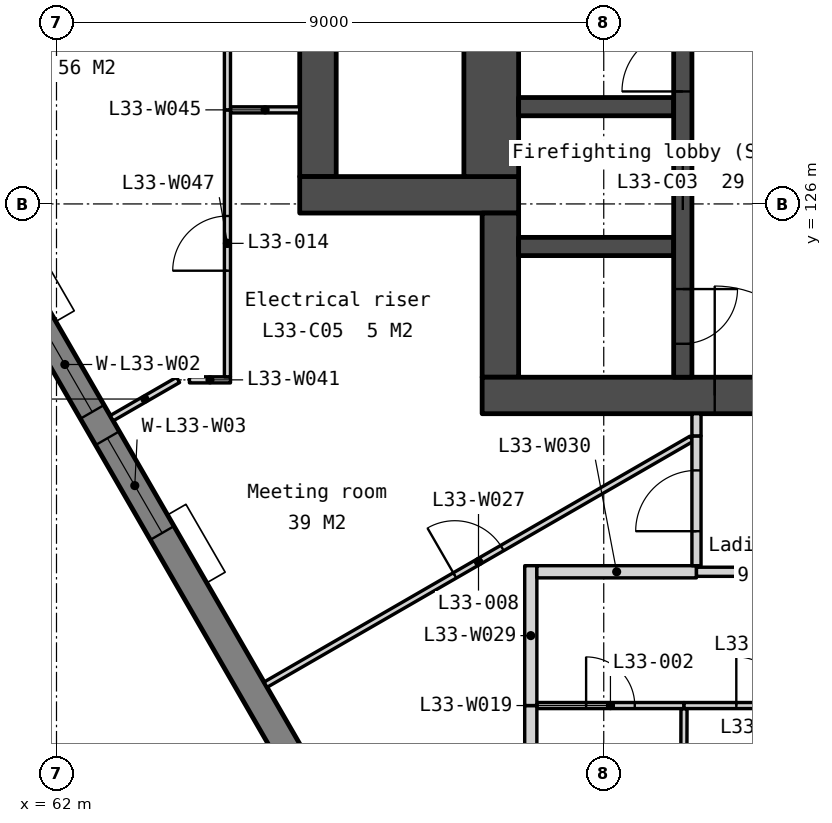
"""IFC4 building model, lengths in metres.
Left out: names, types, materials, properties, quantities, classifications, styles, units other than length and angle.
Written with IfcOpenShell. Run it as: python <this file> out.ifc"""

import sys

from ifc_helpers import new_model, si_unit, direction, frame, frame_2d, origin, place, context, subcontext, project, spatial, polyline, rectangle, outline, extrude, element, fill, save


model = new_model("IFC4")
c1 = context("Model", 3, precision=1e-05, world=origin(), true_north=direction((0.0, 1.0)))
c2 = subcontext(c1, "Body", "Model", "MODEL_VIEW")
j1 = project(units=[si_unit("LENGTHUNIT", "METRE"), si_unit("PLANEANGLEUNIT", "RADIAN")], contexts=[c1])
p1 = place(None, origin())
s1 = spatial("IfcSite", under=j1, at=p1, CompositionType="ELEMENT")
p2 = place(p1, origin())
s2 = spatial("IfcBuilding", under=s1, at=p2, CompositionType="ELEMENT")
p3 = place(p2, frame((0.0, 0.0, 132.5)))
s3 = spatial("IfcBuildingStorey", under=s2, at=p3, CompositionType="ELEMENT", Elevation=132.5)
p4 = place(p3, frame((66.3, 131.35, 0.0), z_axis=(0.0, 0.0, 1.0), x_axis=(0.0, -1.0, 0.0)))
e1 = element("IfcWall", 1, at=p4, inside=s3, PredefinedType="SOLIDWALL", context=c2, shape_type="SweptSolid", body=[
    extrude(rectangle(XDim=4.9, YDim=0.6, at=frame_2d((2.45, 0.0))), origin(), (0.0, 0.0, 1.0), 3.75),
])
p5 = place(p3, frame((66.0, 126.15, 0.0), z_axis=(0.0, 0.0, 1.0), x_axis=(1.0, 0.0, 0.0)))
e2 = element("IfcWall", 2, at=p5, inside=s3, PredefinedType="SOLIDWALL", context=c2, shape_type="SweptSolid", body=[
    extrude(rectangle(XDim=3.6, YDim=0.6, at=frame_2d((1.8, 0.0))), origin(), (0.0, 0.0, 1.0), 3.75),
])
p6 = place(p3, frame((69.15, 131.35, 0.0), z_axis=(0.0, 0.0, 1.0), x_axis=(0.0, -1.0, 0.0)))
e3 = element("IfcWall", 3, at=p6, inside=s3, PredefinedType="SOLIDWALL", context=c2, shape_type="SweptSolid", body=[
    extrude(rectangle(XDim=4.9, YDim=0.9, at=frame_2d((2.45, 0.0))), origin(), (0.0, 0.0, 1.0), 3.75),
])
p7 = place(p3, frame((69.3, 125.85, 0.0), z_axis=(0.0, 0.0, 1.0), x_axis=(0.0, -1.0, 0.0)))
e4 = element("IfcWall", 4, at=p7, inside=s3, PredefinedType="SOLIDWALL", context=c2, shape_type="SweptSolid", body=[
    extrude(rectangle(XDim=2.7, YDim=0.6, at=frame_2d((1.35, 0.0))), origin(), (0.0, 0.0, 1.0), 3.75),
])
p8 = place(p3, frame((69.0, 122.85, 0.0), z_axis=(0.0, 0.0, 1.0), x_axis=(1.0, 0.0, 0.0)))
e5 = element("IfcWall", 5, at=p8, inside=s3, PredefinedType="SOLIDWALL", context=c2, shape_type="SweptSolid", body=[
    extrude(rectangle(XDim=22.0, YDim=0.6, at=frame_2d((11.0, 0.0))), origin(), (0.0, 0.0, 1.0), 3.75),
])
p9 = place(p8, frame((16.375, 0.0, 0.0)))
e6 = element("IfcOpeningElement", 6, at=p9, cuts=e5, PredefinedType="OPENING", context=c2, shape_type="SweptSolid", body=[
    extrude(rectangle(XDim=1.8, YDim=2.1, at=frame_2d((0.9, 1.05))), frame((0.0, 0.31, 0.0), z_axis=(0.0, -1.0, 0.0), x_axis=(1.0, 0.0, 0.0)), (0.0, 0.0, 1.0), 0.62),
])
p10 = place(p8, frame((3.825, 0.0, 0.0)))
e7 = element("IfcOpeningElement", 7, at=p10, cuts=e5, PredefinedType="OPENING", context=c2, shape_type="SweptSolid", body=[
    extrude(rectangle(XDim=1.8, YDim=2.1, at=frame_2d((0.9, 1.05))), frame((0.0, 0.31, 0.0), z_axis=(0.0, -1.0, 0.0), x_axis=(1.0, 0.0, 0.0)), (0.0, 0.0, 1.0), 0.62),
])
p11 = place(p8, frame((12.85, 0.0, 0.0)))
e8 = element("IfcOpeningElement", 8, at=p11, cuts=e5, PredefinedType="OPENING", context=c2, shape_type="SweptSolid", body=[
    extrude(rectangle(XDim=1.5, YDim=2.1, at=frame_2d((0.75, 1.05))), frame((0.0, 0.31, 0.0), z_axis=(0.0, -1.0, 0.0), x_axis=(1.0, 0.0, 0.0)), (0.0, 0.0, 1.0), 0.62),
])
for number, where, z_axis, x_axis in (
    (9, (69.6, 127.6, 0.0), (0.0, 0.0, 1.0), (1.0, 0.0, 0.0)),
    (10, (69.6, 125.3, 0.0), (0.0, 0.0, 1.0), (1.0, 0.0, 0.0)),
):
    element("IfcWall", number, at=place(p3, frame(where, z_axis=z_axis, x_axis=x_axis)), inside=s3, PredefinedType="SOLIDWALL", context=c2, shape_type="SweptSolid", body=[
        extrude(rectangle(XDim=2.55, YDim=0.3, at=frame_2d((1.275, 0.0))), origin(), (0.0, 0.0, 1.0), 3.75),
    ])
p12 = place(p3, frame((72.3, 133.95, 0.0), z_axis=(0.0, 0.0, 1.0), x_axis=(0.0, -1.0, 0.0)))
e11 = element("IfcWall", 11, at=p12, inside=s3, PredefinedType="SOLIDWALL", context=c2, shape_type="SweptSolid", body=[
    extrude(rectangle(XDim=10.8, YDim=0.3, at=frame_2d((5.4, 0.0))), origin(), (0.0, 0.0, 1.0), 3.75),
])
p13 = place(p12, frame((6.95, 0.0, 0.0)))
e12 = element("IfcOpeningElement", 12, at=p13, cuts=e11, PredefinedType="OPENING", context=c2, shape_type="SweptSolid", body=[
    extrude(rectangle(XDim=1.1, YDim=2.1, at=frame_2d((0.55, 1.05))), frame((0.0, 0.16, 0.0), z_axis=(0.0, -1.0, 0.0), x_axis=(1.0, 0.0, 0.0)), (0.0, 0.0, 1.0), 0.32),
])
p14 = place(p12, frame((9.35, 0.0, 0.0)))
e13 = element("IfcOpeningElement", 13, at=p14, cuts=e11, PredefinedType="OPENING", context=c2, shape_type="SweptSolid", body=[
    extrude(rectangle(XDim=0.9, YDim=2.1, at=frame_2d((0.45, 1.05))), frame((0.0, 0.16, 0.0), z_axis=(0.0, -1.0, 0.0), x_axis=(1.0, 0.0, 0.0)), (0.0, 0.0, 1.0), 0.32),
])
p15 = place(p12, frame((5.1, 0.0, 0.0)))
e14 = element("IfcOpeningElement", 14, at=p15, cuts=e11, PredefinedType="OPENING", context=c2, shape_type="SweptSolid", body=[
    extrude(rectangle(XDim=1.0, YDim=2.1, at=frame_2d((0.5, 1.05))), frame((0.0, 0.16, 0.0), z_axis=(0.0, -1.0, 0.0), x_axis=(1.0, 0.0, 0.0)), (0.0, 0.0, 1.0), 0.32),
])
p16 = place(p3, frame((57.652, 131.129, -0.15), z_axis=(0.0, 0.0, 1.0), x_axis=(0.499997369791, -0.866026922331, 0.0)))
e15 = element("IfcWall", 15, at=p16, inside=s3, PredefinedType="SOLIDWALL", context=c2, shape_type="SweptSolid", body=[
    extrude(outline(polyline([(40.486, 0.0), (40.486, 3.9), (0.0, 3.9), (0.0, 0.0), (40.486, 0.0)])), frame((0.0, 0.225, 0.0), z_axis=(0.0, -1.0, 0.0), x_axis=(1.0, 0.0, 0.0)), (0.0, 0.0, 1.0), 0.45),
])
p17 = place(p16, frame((0.837, 0.0, 0.95)))
e16 = element("IfcOpeningElement", 16, at=p17, cuts=e15, PredefinedType="OPENING", context=c2, shape_type="SweptSolid", body=[
    extrude(rectangle(XDim=1.2, YDim=2.2, at=frame_2d((0.6, 1.1))), frame((0.0, 0.235, 0.0), z_axis=(0.0, -1.0, 0.0), x_axis=(1.0, 0.0, 0.0)), (0.0, 0.0, 1.0), 0.47),
])
p18 = place(p16, frame((8.072, 0.0, 0.95)))
e17 = element("IfcOpeningElement", 17, at=p18, cuts=e15, PredefinedType="OPENING", context=c2, shape_type="SweptSolid", body=[
    extrude(rectangle(XDim=1.8, YDim=2.2, at=frame_2d((0.9, 1.1))), frame((0.0, 0.235, 0.0), z_axis=(0.0, -1.0, 0.0), x_axis=(1.0, 0.0, 0.0)), (0.0, 0.0, 1.0), 0.47),
])
p19 = place(p16, frame((10.372, 0.0, 0.95)))
e18 = element("IfcOpeningElement", 18, at=p19, cuts=e15, PredefinedType="OPENING", context=c2, shape_type="SweptSolid", body=[
    extrude(rectangle(XDim=1.8, YDim=2.2, at=frame_2d((0.9, 1.1))), frame((0.0, 0.235, 0.0), z_axis=(0.0, -1.0, 0.0), x_axis=(1.0, 0.0, 0.0)), (0.0, 0.0, 1.0), 0.47),
])
p20 = place(p16, frame((18.193, 0.0, 0.95)))
e19 = element("IfcOpeningElement", 19, at=p20, cuts=e15, PredefinedType="OPENING", context=c2, shape_type="SweptSolid", body=[
    extrude(rectangle(XDim=1.8, YDim=2.2, at=frame_2d((0.9, 1.1))), frame((0.0, 0.235, 0.0), z_axis=(0.0, -1.0, 0.0), x_axis=(1.0, 0.0, 0.0)), (0.0, 0.0, 1.0), 0.47),
])
p21 = place(p16, frame((20.493, 0.0, 0.95)))
e20 = element("IfcOpeningElement", 20, at=p21, cuts=e15, PredefinedType="OPENING", context=c2, shape_type="SweptSolid", body=[
    extrude(rectangle(XDim=1.8, YDim=2.2, at=frame_2d((0.9, 1.1))), frame((0.0, 0.235, 0.0), z_axis=(0.0, -1.0, 0.0), x_axis=(1.0, 0.0, 0.0)), (0.0, 0.0, 1.0), 0.47),
])
p22 = place(p16, frame((28.315, 0.0, 0.95)))
e21 = element("IfcOpeningElement", 21, at=p22, cuts=e15, PredefinedType="OPENING", context=c2, shape_type="SweptSolid", body=[
    extrude(rectangle(XDim=1.8, YDim=2.2, at=frame_2d((0.9, 1.1))), frame((0.0, 0.235, 0.0), z_axis=(0.0, -1.0, 0.0), x_axis=(1.0, 0.0, 0.0)), (0.0, 0.0, 1.0), 0.47),
])
p23 = place(p16, frame((30.615, 0.0, 0.95)))
e22 = element("IfcOpeningElement", 22, at=p23, cuts=e15, PredefinedType="OPENING", context=c2, shape_type="SweptSolid", body=[
    extrude(rectangle(XDim=1.8, YDim=2.2, at=frame_2d((0.9, 1.1))), frame((0.0, 0.235, 0.0), z_axis=(0.0, -1.0, 0.0), x_axis=(1.0, 0.0, 0.0)), (0.0, 0.0, 1.0), 0.47),
])
p24 = place(p16, frame((38.449, 0.0, 0.95)))
e23 = element("IfcOpeningElement", 23, at=p24, cuts=e15, PredefinedType="OPENING", context=c2, shape_type="SweptSolid", body=[
    extrude(rectangle(XDim=1.2, YDim=2.2, at=frame_2d((0.6, 1.1))), frame((0.0, 0.235, 0.0), z_axis=(0.0, -1.0, 0.0), x_axis=(1.0, 0.0, 0.0)), (0.0, 0.0, 1.0), 0.47),
])
p25 = place(p3, frame((72.31, 114.05, 0.0), z_axis=(0.0, 0.0, 1.0), x_axis=(0.002608686776, 0.999996597371, 0.0)))
e24 = element("IfcWall", 24, at=p25, inside=s3, PredefinedType="PARTITIONING", context=c2, shape_type="SweptSolid", body=[
    extrude(rectangle(XDim=3.65, YDim=0.1, at=frame_2d((1.825, 0.0))), origin(), (0.0, 0.0, 1.0), 3.75),
])
p26 = place(p3, frame((69.9, 117.75, 0.0), z_axis=(0.0, 0.0, 1.0), x_axis=(1.0, 0.0, 0.0)))
e25 = element("IfcWall", 25, at=p26, inside=s3, PredefinedType="PARTITIONING", context=c2, shape_type="SweptSolid", body=[
    extrude(rectangle(XDim=2.42, YDim=0.1, at=frame_2d((1.21, 0.0))), origin(), (0.0, 0.0, 1.0), 3.75),
])
p27 = place(p26, frame((0.81, 0.0, 0.0)))
e26 = element("IfcOpeningElement", 26, at=p27, cuts=e25, PredefinedType="OPENING", context=c2, shape_type="SweptSolid", body=[
    extrude(rectangle(XDim=0.8, YDim=2.1, at=frame_2d((0.4, 1.05))), frame((0.0, 0.06, 0.0), z_axis=(0.0, -1.0, 0.0), x_axis=(1.0, 0.0, 0.0)), (0.0, 0.0, 1.0), 0.12),
])
p28 = place(p3, frame((72.32, 117.75, 0.0), z_axis=(0.0, 0.0, 1.0), x_axis=(1.0, 0.0, 0.0)))
e27 = element("IfcWall", 27, at=p28, inside=s3, PredefinedType="PARTITIONING", context=c2, shape_type="SweptSolid", body=[
    extrude(rectangle(XDim=2.52, YDim=0.1, at=frame_2d((1.26, 0.0))), origin(), (0.0, 0.0, 1.0), 3.75),
])
p29 = place(p28, frame((0.86, 0.0, 0.0)))
e28 = element("IfcOpeningElement", 28, at=p29, cuts=e27, PredefinedType="OPENING", context=c2, shape_type="SweptSolid", body=[
    extrude(rectangle(XDim=0.8, YDim=2.1, at=frame_2d((0.4, 1.05))), frame((0.0, 0.06, 0.0), z_axis=(0.0, -1.0, 0.0), x_axis=(1.0, 0.0, 0.0)), (0.0, 0.0, 1.0), 0.12),
])
p30 = place(p3, frame((69.8, 114.768, 0.0), z_axis=(0.0, 0.0, 1.0), x_axis=(0.0, 1.0, 0.0)))
e29 = element("IfcWall", 29, at=p30, inside=s3, PredefinedType="PARTITIONING", context=c2, shape_type="SweptSolid", body=[
    extrude(rectangle(XDim=2.982, YDim=0.2, at=frame_2d((1.491, 0.0))), origin(), (0.0, 0.0, 1.0), 3.75),
])
p31 = place(p3, frame((65.438, 118.093, 0.0), z_axis=(0.0, 0.0, 1.0), x_axis=(0.866029768103, 0.499992440702, 0.0)))
e30 = element("IfcWall", 30, at=p31, inside=s3, PredefinedType="PARTITIONING", context=c2, shape_type="SweptSolid", body=[
    extrude(rectangle(XDim=8.089, YDim=0.1, at=frame_2d((4.044, 0.0))), origin(), (0.0, 0.0, 1.0), 3.75),
])
p32 = place(p31, frame((3.594, 0.0, 0.0)))
e31 = element("IfcOpeningElement", 31, at=p32, cuts=e30, PredefinedType="OPENING", context=c2, shape_type="SweptSolid", body=[
    extrude(rectangle(XDim=0.9, YDim=2.1, at=frame_2d((0.45, 1.05))), frame((0.0, 0.06, 0.0), z_axis=(0.0, -1.0, 0.0), x_axis=(1.0, 0.0, 0.0)), (0.0, 0.0, 1.0), 0.12),
])
p33 = place(p3, frame((69.8, 117.75, 0.0), z_axis=(0.0, 0.0, 1.0), x_axis=(0.0, 1.0, 0.0)))
e32 = element("IfcWall", 32, at=p33, inside=s3, PredefinedType="PARTITIONING", context=c2, shape_type="SweptSolid", body=[
    extrude(rectangle(XDim=2.3, YDim=0.2, at=frame_2d((1.15, 0.0))), origin(), (0.0, 0.0, 1.0), 3.75),
])
p34 = place(p3, frame((69.9, 119.95, 0.0), z_axis=(0.0, 0.0, 1.0), x_axis=(1.0, 0.0, 0.0)))
e33 = element("IfcWall", 33, at=p34, inside=s3, PredefinedType="PARTITIONING", context=c2, shape_type="SweptSolid", body=[
    extrude(rectangle(XDim=2.625, YDim=0.2, at=frame_2d((1.312, 0.0))), origin(), (0.0, 0.0, 1.0), 3.75),
])
p35 = place(p3, frame((72.525, 120.05, 0.0), z_axis=(0.0, 0.0, 1.0), x_axis=(0.0, 1.0, 0.0)))
e34 = element("IfcWall", 34, at=p35, inside=s3, PredefinedType="PARTITIONING", context=c2, shape_type="SweptSolid", body=[
    extrude(rectangle(XDim=2.135, YDim=0.15, at=frame_2d((1.067, 0.0))), origin(), (0.0, 0.0, 1.0), 3.75),
])
p36 = place(p35, frame((0.567, 0.0, 0.0)))
e35 = element("IfcOpeningElement", 35, at=p36, cuts=e34, PredefinedType="OPENING", context=c2, shape_type="SweptSolid", body=[
    extrude(rectangle(XDim=1.0, YDim=2.1, at=frame_2d((0.5, 1.05))), frame((0.0, 0.085, 0.0), z_axis=(0.0, -1.0, 0.0), x_axis=(1.0, 0.0, 0.0)), (0.0, 0.0, 1.0), 0.17),
])
p37 = place(p3, frame((72.525, 119.95, 0.0), z_axis=(0.0, 0.0, 1.0), x_axis=(1.0, 0.0, 0.0)))
e36 = element("IfcWall", 36, at=p37, inside=s3, PredefinedType="PARTITIONING", context=c2, shape_type="SweptSolid", body=[
    extrude(rectangle(XDim=6.2, YDim=0.15, at=frame_2d((3.1, 0.0))), origin(), (0.0, 0.0, 1.0), 3.75),
])
p38 = place(p37, frame((2.6, 0.0, 0.0)))
e37 = element("IfcOpeningElement", 37, at=p38, cuts=e36, PredefinedType="OPENING", context=c2, shape_type="SweptSolid", body=[
    extrude(rectangle(XDim=1.0, YDim=2.1, at=frame_2d((0.5, 1.05))), frame((0.0, 0.085, 0.0), z_axis=(0.0, -1.0, 0.0), x_axis=(1.0, 0.0, 0.0)), (0.0, 0.0, 1.0), 0.17),
])
p39 = place(p3, frame((72.525, 122.185, 0.0), z_axis=(0.0, 0.0, 1.0), x_axis=(0.0, 1.0, 0.0)))
e38 = element("IfcWall", 38, at=p39, inside=s3, PredefinedType="PARTITIONING", context=c2, shape_type="SweptSolid", body=[
    extrude(rectangle(XDim=0.365, YDim=0.15, at=frame_2d((0.183, 0.0))), origin(), (0.0, 0.0, 1.0), 3.75),
])
p40 = place(p3, frame((62.907, 122.476, 0.0), z_axis=(0.0, 0.0, 1.0), x_axis=(0.86607923909, 0.499906742921, 0.0)))
e39 = element("IfcWall", 39, at=p40, inside=s3, PredefinedType="PARTITIONING", context=c2, shape_type="SweptSolid", body=[
    extrude(rectangle(XDim=1.261, YDim=0.1, at=frame_2d((0.631, 0.0))), origin(), (0.0, 0.0, 1.0), 3.75),
])
p41 = place(p3, frame((64.187, 123.106, 0.0), z_axis=(0.0, 0.0, 1.0), x_axis=(0.999999934552, 0.000361794477, 0.0)))
e40 = element("IfcWall", 40, at=p41, inside=s3, PredefinedType="PARTITIONING", context=c2, shape_type="SweptSolid", body=[
    extrude(rectangle(XDim=0.675, YDim=0.1, at=frame_2d((0.337, 0.0))), origin(), (0.0, 0.0, 1.0), 3.75),
])
p42 = place(p3, frame((64.861, 127.547, 0.0), z_axis=(0.0, 0.0, 1.0), x_axis=(1.0, 0.0, 0.0)))
e41 = element("IfcWall", 41, at=p42, inside=s3, PredefinedType="PARTITIONING", context=c2, shape_type="SweptSolid", body=[
    extrude(rectangle(XDim=1.139, YDim=0.1, at=frame_2d((0.569, 0.0))), origin(), (0.0, 0.0, 1.0), 3.75),
])
p43 = place(p3, frame((64.811, 123.156, 0.0), z_axis=(0.0, 0.0, 1.0), x_axis=(0.0, 1.0, 0.0)))
e42 = element("IfcWall", 42, at=p43, inside=s3, PredefinedType="PARTITIONING", context=c2, shape_type="SweptSolid", body=[
    extrude(rectangle(XDim=4.391, YDim=0.1, at=frame_2d((2.195, 0.0))), origin(), (0.0, 0.0, 1.0), 3.75),
])
p44 = place(p43, frame((1.745, 0.0, 0.0)))
e43 = element("IfcOpeningElement", 43, at=p44, cuts=e42, PredefinedType="OPENING", context=c2, shape_type="SweptSolid", body=[
    extrude(rectangle(XDim=0.9, YDim=2.1, at=frame_2d((0.45, 1.05))), frame((0.0, 0.06, 0.0), z_axis=(0.0, -1.0, 0.0), x_axis=(1.0, 0.0, 0.0)), (0.0, 0.0, 1.0), 0.12),
])
p45 = place(p3, frame((64.811, 127.547, 0.0), z_axis=(0.0, 0.0, 1.0), x_axis=(0.0, 1.0, 0.0)))
e44 = element("IfcWall", 44, at=p45, inside=s3, PredefinedType="PARTITIONING", context=c2, shape_type="SweptSolid", body=[
    extrude(rectangle(XDim=7.003, YDim=0.1, at=frame_2d((3.501, 0.0))), origin(), (0.0, 0.0, 1.0), 3.75),
])
p46 = place(p45, frame((3.052, 0.0, 0.0)))
e45 = element("IfcOpeningElement", 45, at=p46, cuts=e44, PredefinedType="OPENING", context=c2, shape_type="SweptSolid", body=[
    extrude(rectangle(XDim=0.9, YDim=2.1, at=frame_2d((0.45, 1.05))), frame((0.0, 0.06, 0.0), z_axis=(0.0, -1.0, 0.0), x_axis=(1.0, 0.0, 0.0)), (0.0, 0.0, 1.0), 0.12),
])
p47 = place(p13, origin())
e46 = element("IfcDoor", 46, at=p47, inside=s3, OperationType="SLIDING_TO_LEFT", PredefinedType="DOOR", context=c2, shape_type="SweptSolid", body=[
    extrude(rectangle(XDim=1.1, YDim=2.1, at=frame_2d((0.55, 1.05))), frame((0.0, 0.025, 0.0), z_axis=(0.0, -1.0, 0.0), x_axis=(1.0, 0.0, 0.0)), (0.0, 0.0, 1.0), 0.05),
])
fill(e12, e46)
p48 = place(p10, origin())
e47 = element("IfcDoor", 47, at=p48, inside=s3, OperationType="DOUBLE_DOOR_DOUBLE_SWING", PredefinedType="DOOR", context=c2, shape_type="SweptSolid", body=[
    extrude(rectangle(XDim=1.8, YDim=2.1, at=frame_2d((0.9, 1.05))), frame((0.0, 0.025, 0.0), z_axis=(0.0, -1.0, 0.0), x_axis=(1.0, 0.0, 0.0)), (0.0, 0.0, 1.0), 0.05),
])
fill(e7, e47)
p49 = place(p14, origin())
e48 = element("IfcDoor", 48, at=p49, inside=s3, OperationType="SINGLE_SWING_LEFT", PredefinedType="DOOR", context=c2, shape_type="SweptSolid", body=[
    extrude(rectangle(XDim=0.9, YDim=2.1, at=frame_2d((0.45, 1.05))), frame((0.0, 0.025, 0.0), z_axis=(0.0, -1.0, 0.0), x_axis=(1.0, 0.0, 0.0)), (0.0, 0.0, 1.0), 0.05),
])
fill(e13, e48)
p50 = place(p15, origin())
e49 = element("IfcDoor", 49, at=p50, inside=s3, OperationType="SINGLE_SWING_RIGHT", PredefinedType="DOOR", context=c2, shape_type="SweptSolid", body=[
    extrude(rectangle(XDim=1.0, YDim=2.1, at=frame_2d((0.5, 1.05))), frame((0.0, 0.025, 0.0), z_axis=(0.0, -1.0, 0.0), x_axis=(1.0, 0.0, 0.0)), (0.0, 0.0, 1.0), 0.05),
])
fill(e14, e49)
p51 = place(p18, origin())
e50 = element("IfcWindow", 50, at=p51, inside=s3, PartitioningType="SINGLE_PANEL", PredefinedType="WINDOW", context=c2, shape_type="SweptSolid", body=[
    extrude(rectangle(XDim=1.8, YDim=2.2, at=frame_2d((0.9, 1.1))), frame((0.0, 0.03, 0.0), z_axis=(0.0, -1.0, 0.0), x_axis=(1.0, 0.0, 0.0)), (0.0, 0.0, 1.0), 0.06),
])
fill(e17, e50)
p52 = place(p19, origin())
e51 = element("IfcWindow", 51, at=p52, inside=s3, PartitioningType="SINGLE_PANEL", PredefinedType="WINDOW", context=c2, shape_type="SweptSolid", body=[
    extrude(rectangle(XDim=1.8, YDim=2.2, at=frame_2d((0.9, 1.1))), frame((0.0, 0.03, 0.0), z_axis=(0.0, -1.0, 0.0), x_axis=(1.0, 0.0, 0.0)), (0.0, 0.0, 1.0), 0.06),
])
fill(e18, e51)
p53 = place(p27, origin())
e52 = element("IfcDoor", 52, at=p53, inside=s3, OperationType="SINGLE_SWING_LEFT", PredefinedType="DOOR", context=c2, shape_type="SweptSolid", body=[
    extrude(rectangle(XDim=0.8, YDim=2.1, at=frame_2d((0.4, 1.05))), frame((0.0, 0.025, 0.0), z_axis=(0.0, -1.0, 0.0), x_axis=(1.0, 0.0, 0.0)), (0.0, 0.0, 1.0), 0.05),
])
fill(e26, e52)
p54 = place(p29, origin())
e53 = element("IfcDoor", 53, at=p54, inside=s3, OperationType="SINGLE_SWING_LEFT", PredefinedType="DOOR", context=c2, shape_type="SweptSolid", body=[
    extrude(rectangle(XDim=0.8, YDim=2.1, at=frame_2d((0.4, 1.05))), frame((0.0, 0.025, 0.0), z_axis=(0.0, -1.0, 0.0), x_axis=(1.0, 0.0, 0.0)), (0.0, 0.0, 1.0), 0.05),
])
fill(e28, e53)
p55 = place(p32, origin())
e54 = element("IfcDoor", 54, at=p55, inside=s3, OperationType="SINGLE_SWING_LEFT", PredefinedType="DOOR", context=c2, shape_type="SweptSolid", body=[
    extrude(rectangle(XDim=0.9, YDim=2.1, at=frame_2d((0.45, 1.05))), frame((0.0, 0.025, 0.0), z_axis=(0.0, -1.0, 0.0), x_axis=(1.0, 0.0, 0.0)), (0.0, 0.0, 1.0), 0.05),
])
fill(e31, e54)
p56 = place(p36, origin())
e55 = element("IfcDoor", 55, at=p56, inside=s3, OperationType="SINGLE_SWING_LEFT", PredefinedType="DOOR", context=c2, shape_type="SweptSolid", body=[
    extrude(rectangle(XDim=1.0, YDim=2.1, at=frame_2d((0.5, 1.05))), frame((0.0, 0.025, 0.0), z_axis=(0.0, -1.0, 0.0), x_axis=(1.0, 0.0, 0.0)), (0.0, 0.0, 1.0), 0.05),
])
fill(e35, e55)
p57 = place(p44, origin())
e56 = element("IfcDoor", 56, at=p57, inside=s3, OperationType="SINGLE_SWING_LEFT", PredefinedType="DOOR", context=c2, shape_type="SweptSolid", body=[
    extrude(rectangle(XDim=0.9, YDim=2.1, at=frame_2d((0.45, 1.05))), frame((0.0, 0.025, 0.0), z_axis=(0.0, -1.0, 0.0), x_axis=(1.0, 0.0, 0.0)), (0.0, 0.0, 1.0), 0.05),
])
fill(e43, e56)
save(model, sys.argv[1])
